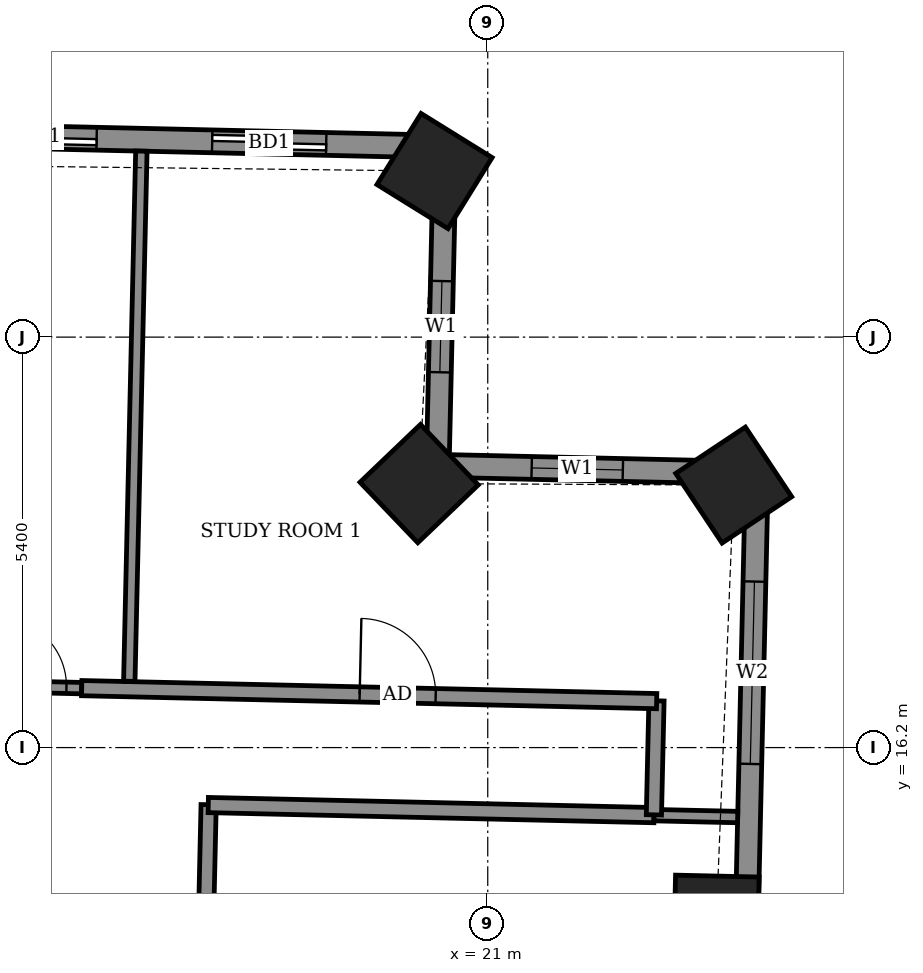
"""IFC4 building model, lengths in metres.
Left out: names, types, materials, properties, quantities, classifications, styles, units other than length and angle.
Written with IfcOpenShell. Run it as: python <this file> out.ifc"""

import sys

from ifc_helpers import new_model, si_unit, direction, frame, frame_2d, origin, origin_2d, place, context, subcontext, project, spatial, rectangle, extrude, element, fill, save


model = new_model("IFC4")
c1 = context("Model", 3, precision=1e-05, world=origin(), true_north=direction((0.0, 1.0)))
c2 = subcontext(c1, "Body", "Model", "MODEL_VIEW")
j1 = project(units=[si_unit("LENGTHUNIT", "METRE"), si_unit("PLANEANGLEUNIT", "RADIAN")], contexts=[c1])
p1 = place(None, origin())
s1 = spatial("IfcSite", under=j1, at=p1, CompositionType="ELEMENT")
p2 = place(p1, origin())
s2 = spatial("IfcBuilding", under=s1, at=p2, CompositionType="ELEMENT")
p3 = place(p2, frame((0.0, 0.0, 208.7)))
s3 = spatial("IfcBuildingStorey", under=s2, at=p3, CompositionType="ELEMENT", Elevation=208.7)
for number, where, z_axis, x_axis in (
    (1, (24.008, 13.959, -0.55), (0.0, 0.0, 1.0), (0.023, 1.0, 0.0)),
    (2, (24.236, 19.653, -0.55), (0.0, 0.0, 1.0), (-0.554, 0.833, 0.0)),
    (3, (20.097, 19.673, -0.55), (0.0, 0.0, 1.0), (-0.691, 0.723, 0.0)),
    (4, (20.3, 23.785, -0.55), (0.0, 0.0, 1.0), (-0.85, 0.527, 0.0)),
):
    element("IfcColumn", number, at=place(p3, frame(where, z_axis=z_axis, x_axis=x_axis)), inside=s3, PredefinedType="COLUMN", context=c2, shape_type="SweptSolid", body=[
        extrude(rectangle(XDim=1.1, YDim=1.1, at=origin_2d()), origin(), (0.0, 0.0, 1.0), 3.6),
    ])
p4 = place(p3, frame((24.259, 7.391, 0.0), z_axis=(0.0, 0.0, 1.0), x_axis=(0.022696408441, 0.999742403344, 0.0)))
e5 = element("IfcWall", 5, at=p4, inside=s3, PredefinedType="SOLIDWALL", context=c2, shape_type="SweptSolid", body=[
    extrude(rectangle(XDim=12.424, YDim=0.3, at=frame_2d((6.212, 0.0))), origin(), (0.0, 0.0, 1.0), 2.55),
])
p5 = place(p4, frame((2.806, 0.0, 0.0)))
e6 = element("IfcOpeningElement", 6, at=p5, cuts=e5, PredefinedType="OPENING", context=c2, shape_type="SweptSolid", body=[
    extrude(rectangle(XDim=1.5, YDim=2.4, at=frame_2d((0.75, 1.2))), frame((0.0, 0.16, 0.0), z_axis=(0.0, -1.0, 0.0), x_axis=(1.0, 0.0, 0.0)), (0.0, 0.0, 1.0), 0.32),
])
p6 = place(p4, frame((8.596, 0.0, 0.9)))
e7 = element("IfcOpeningElement", 7, at=p6, cuts=e5, PredefinedType="OPENING", context=c2, shape_type="SweptSolid", body=[
    extrude(rectangle(XDim=2.4, YDim=1.5, at=frame_2d((1.2, 0.75))), frame((0.0, 0.16, 0.0), z_axis=(0.0, -1.0, 0.0), x_axis=(1.0, 0.0, 0.0)), (0.0, 0.0, 1.0), 0.32),
])
p7 = place(p3, frame((24.541, 19.812, 0.0), z_axis=(0.0, 0.0, 1.0), x_axis=(-0.999744320311, 0.022611811187, 0.0)))
e8 = element("IfcWall", 8, at=p7, inside=s3, PredefinedType="SOLIDWALL", context=c2, shape_type="SweptSolid", body=[
    extrude(rectangle(XDim=4.2, YDim=0.3, at=frame_2d((2.1, 0.0))), origin(), (0.0, 0.0, 1.0), 2.55),
])
p8 = place(p7, frame((1.764, 0.0, 0.9)))
e9 = element("IfcOpeningElement", 9, at=p8, cuts=e8, PredefinedType="OPENING", context=c2, shape_type="SweptSolid", body=[
    extrude(rectangle(XDim=1.2, YDim=1.5, at=frame_2d((0.6, 0.75))), frame((0.0, 0.16, 0.0), z_axis=(0.0, -1.0, 0.0), x_axis=(1.0, 0.0, 0.0)), (0.0, 0.0, 1.0), 0.32),
])
p9 = place(p3, frame((20.342, 19.907, 0.0), z_axis=(0.0, 0.0, 1.0), x_axis=(0.022611811187, 0.999744320311, 0.0)))
e10 = element("IfcWall", 10, at=p9, inside=s3, PredefinedType="SOLIDWALL", context=c2, shape_type="SweptSolid", body=[
    extrude(rectangle(XDim=4.2, YDim=0.3, at=frame_2d((2.1, 0.0))), origin(), (0.0, 0.0, 1.0), 2.55),
])
p10 = place(p9, frame((1.231, 0.0, 0.9)))
e11 = element("IfcOpeningElement", 11, at=p10, cuts=e10, PredefinedType="OPENING", context=c2, shape_type="SweptSolid", body=[
    extrude(rectangle(XDim=1.2, YDim=1.5, at=frame_2d((0.6, 0.75))), frame((0.0, 0.16, 0.0), z_axis=(0.0, -1.0, 0.0), x_axis=(1.0, 0.0, 0.0)), (0.0, 0.0, 1.0), 0.32),
])
p11 = place(p3, frame((20.437, 24.106, 0.0), z_axis=(0.0, 0.0, 1.0), x_axis=(-0.999742506232, 0.022691875925, 0.0)))
e12 = element("IfcWall", 12, at=p11, inside=s3, PredefinedType="SOLIDWALL", context=c2, shape_type="SweptSolid", body=[
    extrude(rectangle(XDim=42.444, YDim=0.3, at=frame_2d((21.222, 0.0))), origin(), (0.0, 0.0, 1.0), 2.55),
])
p12 = place(p11, frame((1.563, 0.0, 0.0)))
e13 = element("IfcOpeningElement", 13, at=p12, cuts=e12, PredefinedType="OPENING", context=c2, shape_type="SweptSolid", body=[
    extrude(rectangle(XDim=1.5, YDim=2.4, at=frame_2d((0.75, 1.2))), frame((0.0, 0.16, 0.0), z_axis=(0.0, -1.0, 0.0), x_axis=(1.0, 0.0, 0.0)), (0.0, 0.0, 1.0), 0.32),
])
p13 = place(p11, frame((4.584, 0.0, 0.0)))
e14 = element("IfcOpeningElement", 14, at=p13, cuts=e12, PredefinedType="OPENING", context=c2, shape_type="SweptSolid", body=[
    extrude(rectangle(XDim=1.5, YDim=2.4, at=frame_2d((0.75, 1.2))), frame((0.0, 0.16, 0.0), z_axis=(0.0, -1.0, 0.0), x_axis=(1.0, 0.0, 0.0)), (0.0, 0.0, 1.0), 0.32),
])
p14 = place(p11, frame((10.269, 0.0, 0.0)))
e15 = element("IfcOpeningElement", 15, at=p14, cuts=e12, PredefinedType="OPENING", context=c2, shape_type="SweptSolid", body=[
    extrude(rectangle(XDim=1.5, YDim=2.4, at=frame_2d((0.75, 1.2))), frame((0.0, 0.16, 0.0), z_axis=(0.0, -1.0, 0.0), x_axis=(1.0, 0.0, 0.0)), (0.0, 0.0, 1.0), 0.32),
])
p15 = place(p11, frame((15.271, 0.0, 0.0)))
e16 = element("IfcOpeningElement", 16, at=p15, cuts=e12, PredefinedType="OPENING", context=c2, shape_type="SweptSolid", body=[
    extrude(rectangle(XDim=1.5, YDim=2.4, at=frame_2d((0.75, 1.2))), frame((0.0, 0.16, 0.0), z_axis=(0.0, -1.0, 0.0), x_axis=(1.0, 0.0, 0.0)), (0.0, 0.0, 1.0), 0.32),
])
p16 = place(p11, frame((18.533, 0.0, 0.0)))
e17 = element("IfcOpeningElement", 17, at=p16, cuts=e12, PredefinedType="OPENING", context=c2, shape_type="SweptSolid", body=[
    extrude(rectangle(XDim=1.5, YDim=2.4, at=frame_2d((0.75, 1.2))), frame((0.0, 0.16, 0.0), z_axis=(0.0, -1.0, 0.0), x_axis=(1.0, 0.0, 0.0)), (0.0, 0.0, 1.0), 0.32),
])
p17 = place(p11, frame((23.819, 0.0, 0.0)))
e18 = element("IfcOpeningElement", 18, at=p17, cuts=e12, PredefinedType="OPENING", context=c2, shape_type="SweptSolid", body=[
    extrude(rectangle(XDim=1.5, YDim=2.4, at=frame_2d((0.75, 1.2))), frame((0.0, 0.16, 0.0), z_axis=(0.0, -1.0, 0.0), x_axis=(1.0, 0.0, 0.0)), (0.0, 0.0, 1.0), 0.32),
])
p18 = place(p11, frame((29.345, 0.0, 0.0)))
e19 = element("IfcOpeningElement", 19, at=p18, cuts=e12, PredefinedType="OPENING", context=c2, shape_type="SweptSolid", body=[
    extrude(rectangle(XDim=1.5, YDim=2.4, at=frame_2d((0.75, 1.2))), frame((0.0, 0.16, 0.0), z_axis=(0.0, -1.0, 0.0), x_axis=(1.0, 0.0, 0.0)), (0.0, 0.0, 1.0), 0.32),
])
p19 = place(p11, frame((32.607, 0.0, 0.0)))
e20 = element("IfcOpeningElement", 20, at=p19, cuts=e12, PredefinedType="OPENING", context=c2, shape_type="SweptSolid", body=[
    extrude(rectangle(XDim=1.5, YDim=2.4, at=frame_2d((0.75, 1.2))), frame((0.0, 0.16, 0.0), z_axis=(0.0, -1.0, 0.0), x_axis=(1.0, 0.0, 0.0)), (0.0, 0.0, 1.0), 0.32),
])
p20 = place(p11, frame((37.783, 0.0, 0.9)))
e21 = element("IfcOpeningElement", 21, at=p20, cuts=e12, PredefinedType="OPENING", context=c2, shape_type="SweptSolid", body=[
    extrude(rectangle(XDim=2.4, YDim=1.5, at=frame_2d((1.2, 0.75))), frame((0.0, 0.16, 0.0), z_axis=(0.0, -1.0, 0.0), x_axis=(1.0, 0.0, 0.0)), (0.0, 0.0, 1.0), 0.32),
])
p21 = place(p3, frame((17.154, 7.786, 0.0), z_axis=(0.0, 0.0, 1.0), x_axis=(0.022680883318, 0.999742755679, 0.0)))
e22 = element("IfcWall", 22, at=p21, inside=s3, PredefinedType="PARTITIONING", context=c2, shape_type="SweptSolid", body=[
    extrude(rectangle(XDim=7.664, YDim=0.2, at=frame_2d((3.832, 0.0))), origin(), (0.0, 0.0, 1.0), 3.05),
])
p22 = place(p21, frame((3.434, 0.0, 0.0)))
e23 = element("IfcOpeningElement", 23, at=p22, cuts=e22, PredefinedType="OPENING", context=c2, shape_type="SweptSolid", body=[
    extrude(rectangle(XDim=1.0, YDim=2.1, at=frame_2d((0.5, 1.05))), frame((0.0, 0.11, 0.0), z_axis=(0.0, -1.0, 0.0), x_axis=(1.0, 0.0, 0.0)), (0.0, 0.0, 1.0), 0.22),
])
p23 = place(p3, frame((17.323, 15.444, 0.0), z_axis=(0.0, 0.0, 1.0), x_axis=(0.999742758565, -0.022680756085, 0.0)))
e24 = element("IfcWall", 24, at=p23, inside=s3, PredefinedType="PARTITIONING", context=c2, shape_type="SweptSolid", body=[
    extrude(rectangle(XDim=5.866, YDim=0.2, at=frame_2d((2.933, 0.0))), origin(), (0.0, 0.0, 1.0), 3.05),
])
p24 = place(p3, frame((23.188, 15.311, 0.0), z_axis=(0.0, 0.0, 1.0), x_axis=(0.999738848859, -0.022852441507, 0.0)))
e25 = element("IfcWall", 25, at=p24, inside=s3, PredefinedType="PARTITIONING", context=c2, shape_type="SweptSolid", body=[
    extrude(rectangle(XDim=1.1, YDim=0.15, at=frame_2d((0.55, 0.0))), origin(), (0.0, 0.0, 1.0), 2.55),
])
p25 = place(p3, frame((23.186, 15.315, 0.0), z_axis=(0.0, 0.0, 1.0), x_axis=(0.022617910375, 0.999744182344, 0.0)))
e26 = element("IfcWall", 26, at=p25, inside=s3, PredefinedType="PARTITIONING", context=c2, shape_type="SweptSolid", body=[
    extrude(rectangle(XDim=1.5, YDim=0.2, at=frame_2d((0.75, 0.0))), origin(), (0.0, 0.0, 1.0), 3.05),
])
p26 = place(p3, frame((-14.871, 17.675, 0.0), z_axis=(0.0, 0.0, 1.0), x_axis=(0.999742359486, -0.02269834024, 0.0)))
e27 = element("IfcWall", 27, at=p26, inside=s3, PredefinedType="PARTITIONING", context=c2, shape_type="SweptSolid", body=[
    extrude(rectangle(XDim=30.536, YDim=0.15, at=frame_2d((15.268, 0.0))), origin(), (0.0, 0.0, 1.0), 3.05),
])
p27 = place(p26, frame((29.436, 0.0, 0.0)))
e28 = element("IfcOpeningElement", 28, at=p27, cuts=e27, PredefinedType="OPENING", context=c2, shape_type="SweptSolid", body=[
    extrude(rectangle(XDim=0.9, YDim=2.1, at=frame_2d((0.45, 1.05))), frame((0.0, 0.085, 0.0), z_axis=(0.0, -1.0, 0.0), x_axis=(1.0, 0.0, 0.0)), (0.0, 0.0, 1.0), 0.17),
])
p28 = place(p26, frame((22.484, 0.0, 0.0)))
e29 = element("IfcOpeningElement", 29, at=p28, cuts=e27, PredefinedType="OPENING", context=c2, shape_type="SweptSolid", body=[
    extrude(rectangle(XDim=0.9, YDim=2.1, at=frame_2d((0.45, 1.05))), frame((0.0, 0.085, 0.0), z_axis=(0.0, -1.0, 0.0), x_axis=(1.0, 0.0, 0.0)), (0.0, 0.0, 1.0), 0.17),
])
p29 = place(p26, frame((20.434, 0.0, 0.0)))
e30 = element("IfcOpeningElement", 30, at=p29, cuts=e27, PredefinedType="OPENING", context=c2, shape_type="SweptSolid", body=[
    extrude(rectangle(XDim=0.9, YDim=2.1, at=frame_2d((0.45, 1.05))), frame((0.0, 0.085, 0.0), z_axis=(0.0, -1.0, 0.0), x_axis=(1.0, 0.0, 0.0)), (0.0, 0.0, 1.0), 0.17),
])
p30 = place(p26, frame((13.484, 0.0, 0.0)))
e31 = element("IfcOpeningElement", 31, at=p30, cuts=e27, PredefinedType="OPENING", context=c2, shape_type="SweptSolid", body=[
    extrude(rectangle(XDim=0.9, YDim=2.1, at=frame_2d((0.45, 1.05))), frame((0.0, 0.085, 0.0), z_axis=(0.0, -1.0, 0.0), x_axis=(1.0, 0.0, 0.0)), (0.0, 0.0, 1.0), 0.17),
])
p31 = place(p26, frame((11.334, 0.0, 0.0)))
e32 = element("IfcOpeningElement", 32, at=p31, cuts=e27, PredefinedType="OPENING", context=c2, shape_type="SweptSolid", body=[
    extrude(rectangle(XDim=0.9, YDim=2.1, at=frame_2d((0.45, 1.05))), frame((0.0, 0.085, 0.0), z_axis=(0.0, -1.0, 0.0), x_axis=(1.0, 0.0, 0.0)), (0.0, 0.0, 1.0), 0.17),
])
p32 = place(p26, frame((4.359, 0.0, 0.0)))
e33 = element("IfcOpeningElement", 33, at=p32, cuts=e27, PredefinedType="OPENING", context=c2, shape_type="SweptSolid", body=[
    extrude(rectangle(XDim=0.9, YDim=2.1, at=frame_2d((0.45, 1.05))), frame((0.0, 0.085, 0.0), z_axis=(0.0, -1.0, 0.0), x_axis=(1.0, 0.0, 0.0)), (0.0, 0.0, 1.0), 0.17),
])
p33 = place(p26, frame((2.009, 0.0, 0.0)))
e34 = element("IfcOpeningElement", 34, at=p33, cuts=e27, PredefinedType="OPENING", context=c2, shape_type="SweptSolid", body=[
    extrude(rectangle(XDim=0.9, YDim=2.1, at=frame_2d((0.45, 1.05))), frame((0.0, 0.085, 0.0), z_axis=(0.0, -1.0, 0.0), x_axis=(1.0, 0.0, 0.0)), (0.0, 0.0, 1.0), 0.17),
])
p34 = place(p3, frame((15.658, 16.982, 0.0), z_axis=(0.0, 0.0, 1.0), x_axis=(0.99974485859, -0.022587999516, 0.0)))
e35 = element("IfcWall", 35, at=p34, inside=s3, PredefinedType="PARTITIONING", context=c2, shape_type="SweptSolid", body=[
    extrude(rectangle(XDim=7.566, YDim=0.2, at=frame_2d((3.783, 0.0))), origin(), (0.0, 0.0, 1.0), 3.05),
])
p35 = place(p34, frame((3.658, 0.0, 0.0)))
e36 = element("IfcOpeningElement", 36, at=p35, cuts=e35, PredefinedType="OPENING", context=c2, shape_type="SweptSolid", body=[
    extrude(rectangle(XDim=1.0, YDim=2.1, at=frame_2d((0.5, 1.05))), frame((0.0, 0.11, 0.0), z_axis=(0.0, -1.0, 0.0), x_axis=(1.0, 0.0, 0.0)), (0.0, 0.0, 1.0), 0.22),
])
p36 = place(p3, frame((16.284, 17.072, 0.0), z_axis=(0.0, 0.0, 1.0), x_axis=(0.022815200701, 0.99973969943, 0.0)))
e37 = element("IfcWall", 37, at=p36, inside=s3, PredefinedType="PARTITIONING", context=c2, shape_type="SweptSolid", body=[
    extrude(rectangle(XDim=6.977, YDim=0.15, at=frame_2d((3.488, 0.0))), origin(), (0.0, 0.0, 1.0), 2.55),
])
p37 = place(p6, origin())
e38 = element("IfcWindow", 38, at=p37, inside=s3, PartitioningType="DOUBLE_PANEL_VERTICAL", PredefinedType="WINDOW", context=c2, shape_type="SweptSolid", body=[
    extrude(rectangle(XDim=2.4, YDim=1.5, at=frame_2d((1.2, 0.75))), frame((0.0, 0.03, 0.0), z_axis=(0.0, -1.0, 0.0), x_axis=(1.0, 0.0, 0.0)), (0.0, 0.0, 1.0), 0.06),
])
fill(e7, e38)
p38 = place(p8, origin())
e39 = element("IfcWindow", 39, at=p38, inside=s3, PartitioningType="SINGLE_PANEL", PredefinedType="WINDOW", context=c2, shape_type="SweptSolid", body=[
    extrude(rectangle(XDim=1.2, YDim=1.5, at=frame_2d((0.6, 0.75))), frame((0.0, 0.03, 0.0), z_axis=(0.0, -1.0, 0.0), x_axis=(1.0, 0.0, 0.0)), (0.0, 0.0, 1.0), 0.06),
])
fill(e9, e39)
p39 = place(p10, origin())
e40 = element("IfcWindow", 40, at=p39, inside=s3, PartitioningType="SINGLE_PANEL", PredefinedType="WINDOW", context=c2, shape_type="SweptSolid", body=[
    extrude(rectangle(XDim=1.2, YDim=1.5, at=frame_2d((0.6, 0.75))), frame((0.0, 0.03, 0.0), z_axis=(0.0, -1.0, 0.0), x_axis=(1.0, 0.0, 0.0)), (0.0, 0.0, 1.0), 0.06),
])
fill(e11, e40)
p40 = place(p12, origin())
e41 = element("IfcDoor", 41, at=p40, inside=s3, OperationType="SLIDING_TO_LEFT", PredefinedType="DOOR", context=c2, shape_type="SweptSolid", body=[
    extrude(rectangle(XDim=1.5, YDim=2.4, at=frame_2d((0.75, 1.2))), frame((0.0, 0.025, 0.0), z_axis=(0.0, -1.0, 0.0), x_axis=(1.0, 0.0, 0.0)), (0.0, 0.0, 1.0), 0.05),
])
fill(e13, e41)
p41 = place(p13, origin())
e42 = element("IfcDoor", 42, at=p41, inside=s3, OperationType="SLIDING_TO_LEFT", PredefinedType="DOOR", context=c2, shape_type="SweptSolid", body=[
    extrude(rectangle(XDim=1.5, YDim=2.4, at=frame_2d((0.75, 1.2))), frame((0.0, 0.025, 0.0), z_axis=(0.0, -1.0, 0.0), x_axis=(1.0, 0.0, 0.0)), (0.0, 0.0, 1.0), 0.05),
])
fill(e14, e42)
p42 = place(p35, origin())
e43 = element("IfcDoor", 43, at=p42, inside=s3, OperationType="SINGLE_SWING_LEFT", PredefinedType="DOOR", context=c2, shape_type="SweptSolid", body=[
    extrude(rectangle(XDim=1.0, YDim=2.1, at=frame_2d((0.5, 1.05))), frame((0.0, 0.025, 0.0), z_axis=(0.0, -1.0, 0.0), x_axis=(1.0, 0.0, 0.0)), (0.0, 0.0, 1.0), 0.05),
])
fill(e36, e43)
p43 = place(p27, origin())
e44 = element("IfcDoor", 44, at=p43, inside=s3, OperationType="SINGLE_SWING_RIGHT", PredefinedType="DOOR", context=c2, shape_type="SweptSolid", body=[
    extrude(rectangle(XDim=0.9, YDim=2.1, at=frame_2d((0.45, 1.05))), frame((0.0, 0.025, 0.0), z_axis=(0.0, -1.0, 0.0), x_axis=(1.0, 0.0, 0.0)), (0.0, 0.0, 1.0), 0.05),
])
fill(e28, e44)
save(model, sys.argv[1])
